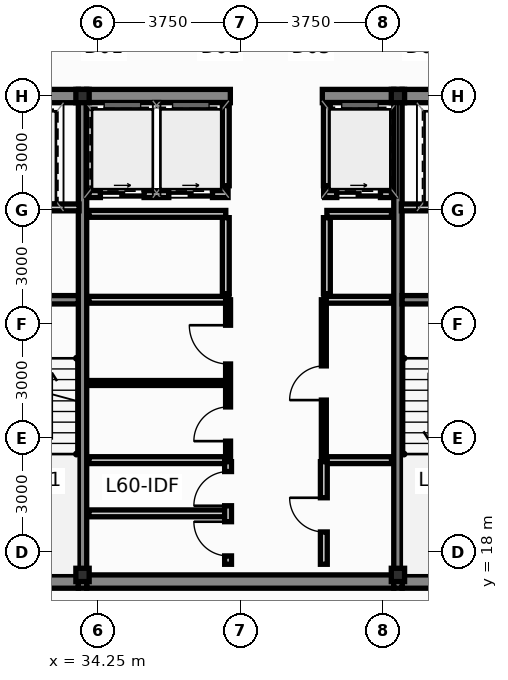
"""IFC4 building model, lengths in metres.
Left out: names, types, materials, properties, quantities, classifications, styles, units other than length and angle.
Written with IfcOpenShell. Run it as: python <this file> out.ifc"""

import sys

from ifc_helpers import new_model, si_unit, direction, frame, frame_2d, origin, origin_2d, place, context, subcontext, project, spatial, rectangle, hollow_rectangle, extrude, source, transform, mapped, element, fill, save


model = new_model("IFC4")
c1 = context("Model", 3, precision=1e-05, world=origin(), true_north=direction((0.0, 1.0)))
c2 = subcontext(c1, "Body", "Model", "MODEL_VIEW")
j1 = project(units=[si_unit("LENGTHUNIT", "METRE"), si_unit("PLANEANGLEUNIT", "RADIAN")], contexts=[c1])
p1 = place(None, origin())
s1 = spatial("IfcSite", under=j1, at=p1, CompositionType="ELEMENT")
p2 = place(p1, origin())
s2 = spatial("IfcBuilding", under=s1, at=p2, CompositionType="ELEMENT")
p3 = place(p2, frame((0.0, 0.0, 229.85)))
s3 = spatial("IfcBuildingStorey", under=s2, at=p3, CompositionType="ELEMENT", Elevation=229.85)
m1 = source(origin(), c2, "Body", "SweptSolid", [
    extrude(hollow_rectangle(XDim=0.35, YDim=0.35, WallThickness=0.016, at=origin_2d()), origin(), (0.0, 0.0, 1.0), 3.65),
])
for number, where, z_axis, x_axis in (
    (1, (33.85, 17.4, 0.0), (0.0, 0.0, 1.0), (1.0, 0.0, 0.0)),
    (2, (42.15, 17.4, 0.0), (0.0, 0.0, 1.0), (1.0, 0.0, 0.0)),
    (3, (33.85, 30.0, 0.0), (0.0, 0.0, 1.0), (1.0, 0.0, 0.0)),
    (4, (42.15, 30.0, 0.0), (0.0, 0.0, 1.0), (1.0, 0.0, 0.0)),
):
    element("IfcColumn", number, at=place(p3, frame(where, z_axis=z_axis, x_axis=x_axis)), inside=s3, PredefinedType="COLUMN", context=c2, shape_type="MappedRepresentation", body=[
        mapped(m1, transform((0.0, 0.0, 0.0), scale=1.0)),
    ])
p4 = place(p3, frame((30.84, 17.225, 0.0), z_axis=(0.0, 0.0, 1.0), x_axis=(1.0, 0.0, 0.0)))
e5 = element("IfcWall", 5, at=p4, inside=s3, PredefinedType="SHEAR", context=c2, shape_type="SweptSolid", body=[
    extrude(rectangle(XDim=2.9, YDim=0.35, at=frame_2d((1.45, 0.0))), origin(), (0.0, 0.0, 1.0), 3.65),
])
p5 = place(p3, frame((33.96, 17.225, 0.0), z_axis=(0.0, 0.0, 1.0), x_axis=(1.0, 0.0, 0.0)))
e6 = element("IfcWall", 6, at=p5, inside=s3, PredefinedType="SHEAR", context=c2, shape_type="SweptSolid", body=[
    extrude(rectangle(XDim=8.08, YDim=0.35, at=frame_2d((4.04, 0.0))), origin(), (0.0, 0.0, 1.0), 3.65),
])
for number, where, z_axis, x_axis in (
    (7, (42.26, 17.225, 0.0), (0.0, 0.0, 1.0), (1.0, 0.0, 0.0)),
    (8, (30.84, 30.0, 0.0), (0.0, 0.0, 1.0), (1.0, 0.0, 0.0)),
):
    element("IfcWall", number, at=place(p3, frame(where, z_axis=z_axis, x_axis=x_axis)), inside=s3, PredefinedType="SHEAR", context=c2, shape_type="SweptSolid", body=[
        extrude(rectangle(XDim=2.9, YDim=0.35, at=frame_2d((1.45, 0.0))), origin(), (0.0, 0.0, 1.0), 3.65),
    ])
p6 = place(p3, frame((33.96, 30.0, 0.0), z_axis=(0.0, 0.0, 1.0), x_axis=(1.0, 0.0, 0.0)))
e9 = element("IfcWall", 9, at=p6, inside=s3, PredefinedType="SHEAR", context=c2, shape_type="SweptSolid", body=[
    extrude(rectangle(XDim=3.78, YDim=0.35, at=frame_2d((1.89, 0.0))), origin(), (0.0, 0.0, 1.0), 3.65),
])
p7 = place(p3, frame((40.16, 30.0, 0.0), z_axis=(0.0, 0.0, 1.0), x_axis=(1.0, 0.0, 0.0)))
e10 = element("IfcWall", 10, at=p7, inside=s3, PredefinedType="SHEAR", context=c2, shape_type="SweptSolid", body=[
    extrude(rectangle(XDim=1.88, YDim=0.35, at=frame_2d((0.94, 0.0))), origin(), (0.0, 0.0, 1.0), 3.65),
])
p8 = place(p3, frame((42.26, 30.0, 0.0), z_axis=(0.0, 0.0, 1.0), x_axis=(1.0, 0.0, 0.0)))
e11 = element("IfcWall", 11, at=p8, inside=s3, PredefinedType="SHEAR", context=c2, shape_type="SweptSolid", body=[
    extrude(rectangle(XDim=2.9, YDim=0.35, at=frame_2d((1.45, 0.0))), origin(), (0.0, 0.0, 1.0), 3.65),
])
for number, where, z_axis, x_axis in (
    (12, (33.85, 17.05, 0.0), (0.0, 0.0, 1.0), (0.0, 1.0, 0.0)),
    (13, (42.15, 17.05, 0.0), (0.0, 0.0, 1.0), (0.0, 1.0, 0.0)),
):
    element("IfcWall", number, at=place(p3, frame(where, z_axis=z_axis, x_axis=x_axis)), inside=s3, PredefinedType="SHEAR", context=c2, shape_type="SweptSolid", body=[
        extrude(rectangle(XDim=13.125, YDim=0.22, at=frame_2d((6.562, 0.0))), origin(), (0.0, 0.0, 1.0), 3.65),
    ])
for number, where, z_axis, x_axis in (
    (14, (30.84, 24.64, 0.0), (0.0, 0.0, 1.0), (1.0, 0.0, 0.0)),
    (15, (42.26, 24.64, 0.0), (0.0, 0.0, 1.0), (1.0, 0.0, 0.0)),
):
    element("IfcWall", number, at=place(p3, frame(where, z_axis=z_axis, x_axis=x_axis)), inside=s3, PredefinedType="SHEAR", context=c2, shape_type="SweptSolid", body=[
        extrude(rectangle(XDim=2.9, YDim=0.22, at=frame_2d((1.45, 0.0))), origin(), (0.0, 0.0, 1.0), 3.65),
    ])
p9 = place(p3, frame((34.02, 26.9, 0.0), z_axis=(0.0, 0.0, 1.0), x_axis=(1.0, 0.0, 0.0)))
e16 = element("IfcWall", 16, at=p9, inside=s3, PredefinedType="PARTITIONING", context=c2, shape_type="SweptSolid", body=[
    extrude(rectangle(XDim=3.6, YDim=0.18, at=frame_2d((1.8, 0.0))), origin(), (0.0, 0.0, 1.0), 3.4),
])
p10 = place(p3, frame((40.28, 26.9, 0.0), z_axis=(0.0, 0.0, 1.0), x_axis=(1.0, 0.0, 0.0)))
e17 = element("IfcWall", 17, at=p10, inside=s3, PredefinedType="PARTITIONING", context=c2, shape_type="SweptSolid", body=[
    extrude(rectangle(XDim=1.7, YDim=0.18, at=frame_2d((0.85, 0.0))), origin(), (0.0, 0.0, 1.0), 3.4),
])
for number, where, z_axis, x_axis in (
    (18, (37.62, 24.8, 0.0), (0.0, 0.0, 1.0), (0.0, 1.0, 0.0)),
    (19, (40.28, 24.8, 0.0), (0.0, 0.0, 1.0), (0.0, 1.0, 0.0)),
):
    element("IfcWall", number, at=place(p3, frame(where, z_axis=z_axis, x_axis=x_axis)), inside=s3, PredefinedType="PARTITIONING", context=c2, shape_type="SweptSolid", body=[
        extrude(rectangle(XDim=2.0, YDim=0.18, at=frame_2d((1.0, 0.0))), origin(), (0.0, 0.0, 1.0), 3.4),
    ])
p11 = place(p3, frame((34.02, 24.64, 0.0), z_axis=(0.0, 0.0, 1.0), x_axis=(1.0, 0.0, 0.0)))
e20 = element("IfcWall", 20, at=p11, inside=s3, PredefinedType="PARTITIONING", context=c2, shape_type="SweptSolid", body=[
    extrude(rectangle(XDim=3.68, YDim=0.18, at=frame_2d((1.84, 0.0))), origin(), (0.0, 0.0, 1.0), 3.4),
])
p12 = place(p3, frame((40.2, 24.64, 0.0), z_axis=(0.0, 0.0, 1.0), x_axis=(1.0, 0.0, 0.0)))
e21 = element("IfcWall", 21, at=p12, inside=s3, PredefinedType="PARTITIONING", context=c2, shape_type="SweptSolid", body=[
    extrude(rectangle(XDim=1.78, YDim=0.18, at=frame_2d((0.89, 0.0))), origin(), (0.0, 0.0, 1.0), 3.4),
])
p13 = place(p3, frame((34.02, 27.42, 0.0), z_axis=(0.0, 0.0, 1.0), x_axis=(1.0, 0.0, 0.0)))
e22 = element("IfcWall", 22, at=p13, inside=s3, PredefinedType="PARTITIONING", context=c2, shape_type="SweptSolid", body=[
    extrude(rectangle(XDim=3.66, YDim=0.18, at=frame_2d((1.83, 0.0))), origin(), (0.0, 0.0, 1.0), 3.4),
])
p14 = place(p13, frame((0.3, 0.0, 0.0)))
e23 = element("IfcOpeningElement", 23, at=p14, cuts=e22, PredefinedType="OPENING", context=c2, shape_type="SweptSolid", body=[
    extrude(rectangle(XDim=1.15, YDim=2.2, at=frame_2d((0.575, 1.1))), frame((0.0, 0.102, 0.0), z_axis=(0.0, -1.0, 0.0), x_axis=(1.0, 0.0, 0.0)), (0.0, 0.0, 1.0), 0.204),
])
p15 = place(p13, frame((2.1, 0.0, 0.0)))
e24 = element("IfcOpeningElement", 24, at=p15, cuts=e22, PredefinedType="OPENING", context=c2, shape_type="SweptSolid", body=[
    extrude(rectangle(XDim=1.15, YDim=2.2, at=frame_2d((0.575, 1.1))), frame((0.0, 0.102, 0.0), z_axis=(0.0, -1.0, 0.0), x_axis=(1.0, 0.0, 0.0)), (0.0, 0.0, 1.0), 0.204),
])
p16 = place(p3, frame((40.22, 27.42, 0.0), z_axis=(0.0, 0.0, 1.0), x_axis=(1.0, 0.0, 0.0)))
e25 = element("IfcWall", 25, at=p16, inside=s3, PredefinedType="PARTITIONING", context=c2, shape_type="SweptSolid", body=[
    extrude(rectangle(XDim=1.76, YDim=0.18, at=frame_2d((0.88, 0.0))), origin(), (0.0, 0.0, 1.0), 3.4),
])
p17 = place(p16, frame((0.32, 0.0, 0.0)))
e26 = element("IfcOpeningElement", 26, at=p17, cuts=e25, PredefinedType="OPENING", context=c2, shape_type="SweptSolid", body=[
    extrude(rectangle(XDim=1.15, YDim=2.2, at=frame_2d((0.575, 1.1))), frame((0.0, 0.102, 0.0), z_axis=(0.0, -1.0, 0.0), x_axis=(1.0, 0.0, 0.0)), (0.0, 0.0, 1.0), 0.204),
])
for number, where, z_axis, x_axis in (
    (27, (37.62, 27.64, 0.0), (0.0, 0.0, 1.0), (0.0, 1.0, 0.0)),
    (28, (40.28, 27.64, 0.0), (0.0, 0.0, 1.0), (0.0, 1.0, 0.0)),
):
    element("IfcWall", number, at=place(p3, frame(where, z_axis=z_axis, x_axis=x_axis)), inside=s3, PredefinedType="PARTITIONING", context=c2, shape_type="SweptSolid", body=[
        extrude(rectangle(XDim=2.11, YDim=0.18, at=frame_2d((1.055, 0.0))), origin(), (0.0, 0.0, 1.0), 3.4),
    ])
for number, where, z_axis, x_axis in (
    (29, (30.86, 27.07, 0.0), (0.0, 0.0, 1.0), (1.0, 0.0, 0.0)),
    (30, (42.24, 27.07, 0.0), (0.0, 0.0, 1.0), (1.0, 0.0, 0.0)),
):
    element("IfcWall", number, at=place(p3, frame(where, z_axis=z_axis, x_axis=x_axis)), inside=s3, PredefinedType="PARTITIONING", context=c2, shape_type="SweptSolid", body=[
        extrude(rectangle(XDim=2.9, YDim=0.18, at=frame_2d((1.45, 0.0))), origin(), (0.0, 0.0, 1.0), 3.4),
    ])
p18 = place(p3, frame((34.02, 20.42, 0.0), z_axis=(0.0, 0.0, 1.0), x_axis=(1.0, 0.0, 0.0)))
e31 = element("IfcWall", 31, at=p18, inside=s3, PredefinedType="PARTITIONING", context=c2, shape_type="SweptSolid", body=[
    extrude(rectangle(XDim=3.64, YDim=0.18, at=frame_2d((1.82, 0.0))), origin(), (0.0, 0.0, 1.0), 3.4),
])
p19 = place(p3, frame((40.22, 20.42, 0.0), z_axis=(0.0, 0.0, 1.0), x_axis=(1.0, 0.0, 0.0)))
e32 = element("IfcWall", 32, at=p19, inside=s3, PredefinedType="PARTITIONING", context=c2, shape_type="SweptSolid", body=[
    extrude(rectangle(XDim=1.76, YDim=0.18, at=frame_2d((0.88, 0.0))), origin(), (0.0, 0.0, 1.0), 3.4),
])
p20 = place(p3, frame((34.02, 22.45, 0.0), z_axis=(0.0, 0.0, 1.0), x_axis=(1.0, 0.0, 0.0)))
e33 = element("IfcWall", 33, at=p20, inside=s3, PredefinedType="PARTITIONING", context=c2, shape_type="SweptSolid", body=[
    extrude(rectangle(XDim=3.58, YDim=0.13, at=frame_2d((1.79, 0.0))), origin(), (0.0, 0.0, 1.0), 3.4),
])
p21 = place(p3, frame((37.68, 20.5, 0.0), z_axis=(0.0, 0.0, 1.0), x_axis=(0.0, 1.0, 0.0)))
e34 = element("IfcWall", 34, at=p21, inside=s3, PredefinedType="PARTITIONING", context=c2, shape_type="SweptSolid", body=[
    extrude(rectangle(XDim=4.14, YDim=0.13, at=frame_2d((2.07, 0.0))), origin(), (0.0, 0.0, 1.0), 3.4),
])
p22 = place(p21, frame((0.42, 0.0, 0.0)))
e35 = element("IfcOpeningElement", 35, at=p22, cuts=e34, PredefinedType="OPENING", context=c2, shape_type="SweptSolid", body=[
    extrude(rectangle(XDim=0.9, YDim=2.1, at=frame_2d((0.45, 1.05))), frame((0.0, 0.077, 0.0), z_axis=(0.0, -1.0, 0.0), x_axis=(1.0, 0.0, 0.0)), (0.0, 0.0, 1.0), 0.154),
])
p23 = place(p21, frame((2.45, 0.0, 0.0)))
e36 = element("IfcOpeningElement", 36, at=p23, cuts=e34, PredefinedType="OPENING", context=c2, shape_type="SweptSolid", body=[
    extrude(rectangle(XDim=1.02, YDim=2.15, at=frame_2d((0.51, 1.075))), frame((0.0, 0.077, 0.0), z_axis=(0.0, -1.0, 0.0), x_axis=(1.0, 0.0, 0.0)), (0.0, 0.0, 1.0), 0.154),
])
p24 = place(p3, frame((40.2, 20.5, 0.0), z_axis=(0.0, 0.0, 1.0), x_axis=(0.0, 1.0, 0.0)))
e37 = element("IfcWall", 37, at=p24, inside=s3, PredefinedType="PARTITIONING", context=c2, shape_type="SweptSolid", body=[
    extrude(rectangle(XDim=4.14, YDim=0.13, at=frame_2d((2.07, 0.0))), origin(), (0.0, 0.0, 1.0), 3.4),
])
p25 = place(p24, frame((1.5, 0.0, 0.0)))
e38 = element("IfcOpeningElement", 38, at=p25, cuts=e37, PredefinedType="OPENING", context=c2, shape_type="SweptSolid", body=[
    extrude(rectangle(XDim=0.9, YDim=2.1, at=frame_2d((0.45, 1.05))), frame((0.0, 0.077, 0.0), z_axis=(0.0, -1.0, 0.0), x_axis=(1.0, 0.0, 0.0)), (0.0, 0.0, 1.0), 0.154),
])
p26 = place(p3, frame((34.02, 19.02, 0.0), z_axis=(0.0, 0.0, 1.0), x_axis=(1.0, 0.0, 0.0)))
e39 = element("IfcWall", 39, at=p26, inside=s3, PredefinedType="PARTITIONING", context=c2, shape_type="SweptSolid", body=[
    extrude(rectangle(XDim=3.58, YDim=0.18, at=frame_2d((1.79, 0.0))), origin(), (0.0, 0.0, 1.0), 3.4),
])
p27 = place(p3, frame((37.68, 17.68, 0.0), z_axis=(0.0, 0.0, 1.0), x_axis=(0.0, 1.0, 0.0)))
e40 = element("IfcWall", 40, at=p27, inside=s3, PredefinedType="PARTITIONING", context=c2, shape_type="SweptSolid", body=[
    extrude(rectangle(XDim=2.7, YDim=0.18, at=frame_2d((1.35, 0.0))), origin(), (0.0, 0.0, 1.0), 3.4),
])
p28 = place(p27, frame((0.22, 0.0, 0.0)))
e41 = element("IfcOpeningElement", 41, at=p28, cuts=e40, PredefinedType="OPENING", context=c2, shape_type="SweptSolid", body=[
    extrude(rectangle(XDim=0.9, YDim=2.1, at=frame_2d((0.45, 1.05))), frame((0.0, 0.102, 0.0), z_axis=(0.0, -1.0, 0.0), x_axis=(1.0, 0.0, 0.0)), (0.0, 0.0, 1.0), 0.204),
])
p29 = place(p27, frame((1.54, 0.0, 0.0)))
e42 = element("IfcOpeningElement", 42, at=p29, cuts=e40, PredefinedType="OPENING", context=c2, shape_type="SweptSolid", body=[
    extrude(rectangle(XDim=0.9, YDim=2.1, at=frame_2d((0.45, 1.05))), frame((0.0, 0.102, 0.0), z_axis=(0.0, -1.0, 0.0), x_axis=(1.0, 0.0, 0.0)), (0.0, 0.0, 1.0), 0.204),
])
p30 = place(p3, frame((40.2, 17.68, 0.0), z_axis=(0.0, 0.0, 1.0), x_axis=(0.0, 1.0, 0.0)))
e43 = element("IfcWall", 43, at=p30, inside=s3, PredefinedType="PARTITIONING", context=c2, shape_type="SweptSolid", body=[
    extrude(rectangle(XDim=2.7, YDim=0.18, at=frame_2d((1.35, 0.0))), origin(), (0.0, 0.0, 1.0), 3.4),
])
p31 = place(p30, frame((0.85, 0.0, 0.0)))
e44 = element("IfcOpeningElement", 44, at=p31, cuts=e43, PredefinedType="OPENING", context=c2, shape_type="SweptSolid", body=[
    extrude(rectangle(XDim=0.9, YDim=2.1, at=frame_2d((0.45, 1.05))), frame((0.0, 0.102, 0.0), z_axis=(0.0, -1.0, 0.0), x_axis=(1.0, 0.0, 0.0)), (0.0, 0.0, 1.0), 0.204),
])
p32 = place(p14, origin())
e45 = element("IfcDoor", 45, at=p32, inside=s3, OperationType="SLIDING_TO_RIGHT", PredefinedType="DOOR", context=c2, shape_type="SweptSolid", body=[
    extrude(rectangle(XDim=1.15, YDim=2.2, at=frame_2d((0.575, 1.1))), frame((0.0, 0.025, 0.0), z_axis=(0.0, -1.0, 0.0), x_axis=(1.0, 0.0, 0.0)), (0.0, 0.0, 1.0), 0.05),
])
fill(e23, e45)
p33 = place(p15, origin())
e46 = element("IfcDoor", 46, at=p33, inside=s3, OperationType="SLIDING_TO_LEFT", PredefinedType="DOOR", context=c2, shape_type="SweptSolid", body=[
    extrude(rectangle(XDim=1.15, YDim=2.2, at=frame_2d((0.575, 1.1))), frame((0.0, 0.025, 0.0), z_axis=(0.0, -1.0, 0.0), x_axis=(1.0, 0.0, 0.0)), (0.0, 0.0, 1.0), 0.05),
])
fill(e24, e46)
p34 = place(p17, origin())
e47 = element("IfcDoor", 47, at=p34, inside=s3, OperationType="SLIDING_TO_RIGHT", PredefinedType="DOOR", context=c2, shape_type="SweptSolid", body=[
    extrude(rectangle(XDim=1.15, YDim=2.2, at=frame_2d((0.575, 1.1))), frame((0.0, 0.025, 0.0), z_axis=(0.0, -1.0, 0.0), x_axis=(1.0, 0.0, 0.0)), (0.0, 0.0, 1.0), 0.05),
])
fill(e26, e47)
p35 = place(p22, origin())
e48 = element("IfcDoor", 48, at=p35, inside=s3, OperationType="SINGLE_SWING_LEFT", PredefinedType="DOOR", context=c2, shape_type="SweptSolid", body=[
    extrude(rectangle(XDim=0.9, YDim=2.1, at=frame_2d((0.45, 1.05))), frame((0.0, 0.025, 0.0), z_axis=(0.0, -1.0, 0.0), x_axis=(1.0, 0.0, 0.0)), (0.0, 0.0, 1.0), 0.05),
])
fill(e35, e48)
p36 = place(p23, origin())
e49 = element("IfcDoor", 49, at=p36, inside=s3, OperationType="SINGLE_SWING_RIGHT", PredefinedType="DOOR", context=c2, shape_type="SweptSolid", body=[
    extrude(rectangle(XDim=1.02, YDim=2.15, at=frame_2d((0.51, 1.075))), frame((0.0, 0.025, 0.0), z_axis=(0.0, -1.0, 0.0), x_axis=(1.0, 0.0, 0.0)), (0.0, 0.0, 1.0), 0.05),
])
fill(e36, e49)
p37 = place(p25, origin())
e50 = element("IfcDoor", 50, at=p37, inside=s3, OperationType="SINGLE_SWING_LEFT", PredefinedType="DOOR", context=c2, shape_type="SweptSolid", body=[
    extrude(rectangle(XDim=0.9, YDim=2.1, at=frame_2d((0.45, 1.05))), frame((0.0, 0.025, 0.0), z_axis=(0.0, -1.0, 0.0), x_axis=(1.0, 0.0, 0.0)), (0.0, 0.0, 1.0), 0.05),
])
fill(e38, e50)
p38 = place(p28, origin())
e51 = element("IfcDoor", 51, at=p38, inside=s3, OperationType="SINGLE_SWING_RIGHT", PredefinedType="DOOR", context=c2, shape_type="SweptSolid", body=[
    extrude(rectangle(XDim=0.9, YDim=2.1, at=frame_2d((0.45, 1.05))), frame((0.0, 0.025, 0.0), z_axis=(0.0, -1.0, 0.0), x_axis=(1.0, 0.0, 0.0)), (0.0, 0.0, 1.0), 0.05),
])
fill(e41, e51)
p39 = place(p29, origin())
e52 = element("IfcDoor", 52, at=p39, inside=s3, OperationType="SINGLE_SWING_LEFT", PredefinedType="DOOR", context=c2, shape_type="SweptSolid", body=[
    extrude(rectangle(XDim=0.9, YDim=2.1, at=frame_2d((0.45, 1.05))), frame((0.0, 0.025, 0.0), z_axis=(0.0, -1.0, 0.0), x_axis=(1.0, 0.0, 0.0)), (0.0, 0.0, 1.0), 0.05),
])
fill(e42, e52)
p40 = place(p31, origin())
e53 = element("IfcDoor", 53, at=p40, inside=s3, OperationType="SINGLE_SWING_RIGHT", PredefinedType="DOOR", context=c2, shape_type="SweptSolid", body=[
    extrude(rectangle(XDim=0.9, YDim=2.1, at=frame_2d((0.45, 1.05))), frame((0.0, 0.025, 0.0), z_axis=(0.0, -1.0, 0.0), x_axis=(1.0, 0.0, 0.0)), (0.0, 0.0, 1.0), 0.05),
])
fill(e44, e53)
save(model, sys.argv[1])
